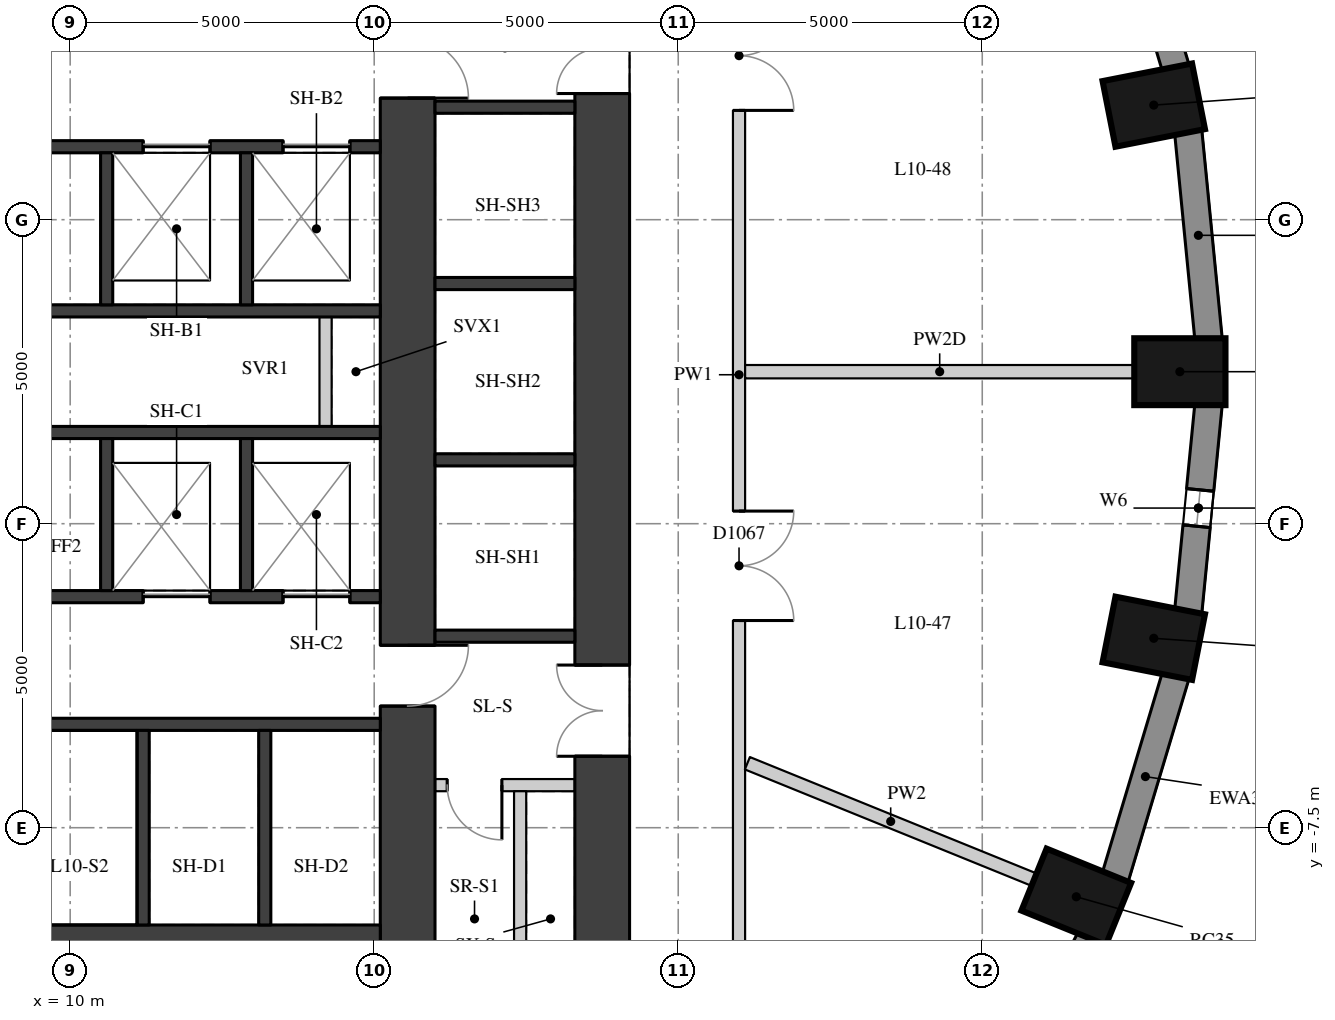
"""IFC4 building model, lengths in metres.
Left out: names, types, materials, properties, quantities, classifications, styles, units other than length and angle.
Written with IfcOpenShell. Run it as: python <this file> out.ifc"""

import sys

from ifc_helpers import new_model, si_unit, direction, frame, frame_2d, origin, origin_2d, place, context, subcontext, project, spatial, rectangle, extrude, element, fill, save


model = new_model("IFC4")
c1 = context("Model", 3, precision=1e-05, world=origin(), true_north=direction((0.0, 1.0)))
c2 = subcontext(c1, "Body", "Model", "MODEL_VIEW")
j1 = project(units=[si_unit("LENGTHUNIT", "METRE"), si_unit("PLANEANGLEUNIT", "RADIAN")], contexts=[c1])
p1 = place(None, origin())
s1 = spatial("IfcSite", under=j1, at=p1, CompositionType="ELEMENT")
p2 = place(p1, origin())
s2 = spatial("IfcBuilding", under=s1, at=p2, CompositionType="ELEMENT")
p3 = place(p2, frame((0.0, 0.0, 41.5)))
s3 = spatial("IfcBuildingStorey", under=s2, at=p3, CompositionType="ELEMENT", Elevation=41.5)
for number, where, z_axis, x_axis in (
    (1, (28.25, 0.0, 0.0), (0.0, 0.0, 1.0), (1.0, 0.0, 0.0)),
    (2, (27.821, 4.385, 0.0), (0.0, 0.0, 1.0), (0.981, 0.193, 0.0)),
    (3, (26.546, -8.636, 0.0), (0.0, 0.0, 1.0), (0.927, -0.376, 0.0)),
    (4, (27.821, -4.385, 0.0), (0.0, 0.0, 1.0), (0.981, -0.193, 0.0)),
):
    element("IfcColumn", number, at=place(p3, frame(where, z_axis=z_axis, x_axis=x_axis)), inside=s3, PredefinedType="COLUMN", context=c2, shape_type="SweptSolid", body=[
        extrude(rectangle(XDim=1.5, YDim=1.1, at=origin_2d()), origin(), (0.0, 0.0, 1.0), 3.3),
    ])
p4 = place(p3, frame((28.722, 0.53, 0.0), z_axis=(0.0, 0.0, 1.0), x_axis=(-0.097389581596, 0.995246336038, 0.0)))
e5 = element("IfcWall", 5, at=p4, inside=s3, PredefinedType="SOLIDWALL", context=c2, shape_type="SweptSolid", body=[
    extrude(rectangle(XDim=3.442, YDim=0.45, at=frame_2d((1.721, 0.0))), origin(), (0.0, 0.0, 1.0), 3.02),
])
p5 = place(p3, frame((28.182, 4.996, 0.0), z_axis=(0.0, 0.0, 1.0), x_axis=(-0.287064133733, 0.957911364963, 0.0)))
e6 = element("IfcWall", 6, at=p5, inside=s3, PredefinedType="SOLIDWALL", context=c2, shape_type="SweptSolid", body=[
    extrude(rectangle(XDim=3.473, YDim=0.45, at=frame_2d((1.737, 0.0))), origin(), (0.0, 0.0, 1.0), 3.02),
])
p6 = place(p5, frame((1.437, 0.0, 0.4)))
e7 = element("IfcOpeningElement", 7, at=p6, cuts=e6, PredefinedType="OPENING", context=c2, shape_type="SweptSolid", body=[
    extrude(rectangle(XDim=0.6, YDim=1.75, at=frame_2d((0.3, 0.875))), frame((0.0, 0.235, 0.0), z_axis=(0.0, -1.0, 0.0), x_axis=(1.0, 0.0, 0.0)), (0.0, 0.0, 1.0), 0.47),
])
p7 = place(p3, frame((25.152, -12.437, 0.0), z_axis=(0.0, 0.0, 1.0), x_axis=(0.462492775226, 0.886623050041, 0.0)))
e8 = element("IfcWall", 8, at=p7, inside=s3, PredefinedType="SOLIDWALL", context=c2, shape_type="SweptSolid", body=[
    extrude(rectangle(XDim=3.532, YDim=0.45, at=frame_2d((1.766, 0.0))), origin(), (0.0, 0.0, 1.0), 3.02),
])
p8 = place(p7, frame((1.466, 0.0, 0.4)))
e9 = element("IfcOpeningElement", 9, at=p8, cuts=e8, PredefinedType="OPENING", context=c2, shape_type="SweptSolid", body=[
    extrude(rectangle(XDim=0.6, YDim=1.75, at=frame_2d((0.3, 0.875))), frame((0.0, 0.235, 0.0), z_axis=(0.0, -1.0, 0.0), x_axis=(1.0, 0.0, 0.0)), (0.0, 0.0, 1.0), 0.47),
])
p9 = place(p3, frame((27.185, -8.323, 0.0), z_axis=(0.0, 0.0, 1.0), x_axis=(0.287064133733, 0.957911364963, 0.0)))
e10 = element("IfcWall", 10, at=p9, inside=s3, PredefinedType="SOLIDWALL", context=c2, shape_type="SweptSolid", body=[
    extrude(rectangle(XDim=3.473, YDim=0.45, at=frame_2d((1.737, 0.0))), origin(), (0.0, 0.0, 1.0), 3.02),
])
p10 = place(p3, frame((28.387, -3.956, 0.0), z_axis=(0.0, 0.0, 1.0), x_axis=(0.097389581596, 0.995246336038, 0.0)))
e11 = element("IfcWall", 11, at=p10, inside=s3, PredefinedType="SOLIDWALL", context=c2, shape_type="SweptSolid", body=[
    extrude(rectangle(XDim=3.442, YDim=0.45, at=frame_2d((1.721, 0.0))), origin(), (0.0, 0.0, 1.0), 3.02),
])
p11 = place(p10, frame((1.421, 0.0, 0.4)))
e12 = element("IfcOpeningElement", 12, at=p11, cuts=e11, PredefinedType="OPENING", context=c2, shape_type="SweptSolid", body=[
    extrude(rectangle(XDim=0.6, YDim=1.75, at=frame_2d((0.3, 0.875))), frame((0.0, 0.235, 0.0), z_axis=(0.0, -1.0, 0.0), x_axis=(1.0, 0.0, 0.0)), (0.0, 0.0, 1.0), 0.47),
])
p12 = place(p3, frame((18.75, -11.1, 0.0), z_axis=(0.0, 0.0, 1.0), x_axis=(0.0, 1.0, 0.0)))
e13 = element("IfcWall", 13, at=p12, inside=s3, PredefinedType="SHEAR", context=c2, shape_type="SweptSolid", body=[
    extrude(rectangle(XDim=22.2, YDim=0.9, at=frame_2d((11.1, 0.0))), origin(), (0.0, 0.0, 1.0), 3.02),
])
p13 = place(p12, frame((15.675, 0.0, 0.0)))
e14 = element("IfcOpeningElement", 14, at=p13, cuts=e13, PredefinedType="OPENING", context=c2, shape_type="SweptSolid", body=[
    extrude(rectangle(XDim=1.5, YDim=2.1, at=frame_2d((0.75, 1.05))), frame((0.0, 0.46, 0.0), z_axis=(0.0, -1.0, 0.0), x_axis=(1.0, 0.0, 0.0)), (0.0, 0.0, 1.0), 0.92),
])
p14 = place(p12, frame((4.775, 0.0, 0.0)))
e15 = element("IfcOpeningElement", 15, at=p14, cuts=e13, PredefinedType="OPENING", context=c2, shape_type="SweptSolid", body=[
    extrude(rectangle(XDim=1.5, YDim=2.1, at=frame_2d((0.75, 1.05))), frame((0.0, 0.46, 0.0), z_axis=(0.0, -1.0, 0.0), x_axis=(1.0, 0.0, 0.0)), (0.0, 0.0, 1.0), 0.92),
])
p15 = place(p3, frame((15.55, -11.1, 0.0), z_axis=(0.0, 0.0, 1.0), x_axis=(0.0, 1.0, 0.0)))
e16 = element("IfcWall", 16, at=p15, inside=s3, PredefinedType="SHEAR", context=c2, shape_type="SweptSolid", body=[
    extrude(rectangle(XDim=22.2, YDim=0.9, at=frame_2d((11.1, 0.0))), origin(), (0.0, 0.0, 1.0), 3.02),
])
p16 = place(p15, frame((15.6, 0.0, 0.0)))
e17 = element("IfcOpeningElement", 17, at=p16, cuts=e16, PredefinedType="OPENING", context=c2, shape_type="SweptSolid", body=[
    extrude(rectangle(XDim=1.0, YDim=2.1, at=frame_2d((0.5, 1.05))), frame((0.0, 0.46, 0.0), z_axis=(0.0, -1.0, 0.0), x_axis=(1.0, 0.0, 0.0)), (0.0, 0.0, 1.0), 0.92),
])
p17 = place(p15, frame((5.6, 0.0, 0.0)))
e18 = element("IfcOpeningElement", 18, at=p17, cuts=e16, PredefinedType="OPENING", context=c2, shape_type="SweptSolid", body=[
    extrude(rectangle(XDim=1.0, YDim=2.1, at=frame_2d((0.5, 1.05))), frame((0.0, 0.46, 0.0), z_axis=(0.0, -1.0, 0.0), x_axis=(1.0, 0.0, 0.0)), (0.0, 0.0, 1.0), 0.92),
])
p18 = place(p3, frame((4.9, -9.55, 0.0), z_axis=(0.0, 0.0, 1.0), x_axis=(1.0, 0.0, 0.0)))
e19 = element("IfcWall", 19, at=p18, inside=s3, PredefinedType="SHEAR", context=c2, shape_type="SweptSolid", body=[
    extrude(rectangle(XDim=10.2, YDim=0.9, at=frame_2d((5.1, 0.0))), origin(), (0.0, 0.0, 1.0), 3.02),
])
p19 = place(p3, frame((4.9, 3.7, 0.0), z_axis=(0.0, 0.0, 1.0), x_axis=(1.0, 0.0, 0.0)))
e20 = element("IfcWall", 20, at=p19, inside=s3, PredefinedType="SHEAR", context=c2, shape_type="SweptSolid", body=[
    extrude(rectangle(XDim=10.2, YDim=0.2, at=frame_2d((5.1, 0.0))), origin(), (0.0, 0.0, 1.0), 3.02),
])
p20 = place(p19, frame((6.3, 0.0, 0.0)))
e21 = element("IfcOpeningElement", 21, at=p20, cuts=e20, PredefinedType="OPENING", context=c2, shape_type="SweptSolid", body=[
    extrude(rectangle(XDim=1.1, YDim=2.1, at=frame_2d((0.55, 1.05))), frame((0.0, 0.11, 0.0), z_axis=(0.0, -1.0, 0.0), x_axis=(1.0, 0.0, 0.0)), (0.0, 0.0, 1.0), 0.22),
])
p21 = place(p19, frame((8.6, 0.0, 0.0)))
e22 = element("IfcOpeningElement", 22, at=p21, cuts=e20, PredefinedType="OPENING", context=c2, shape_type="SweptSolid", body=[
    extrude(rectangle(XDim=1.1, YDim=2.1, at=frame_2d((0.55, 1.05))), frame((0.0, 0.11, 0.0), z_axis=(0.0, -1.0, 0.0), x_axis=(1.0, 0.0, 0.0)), (0.0, 0.0, 1.0), 0.22),
])
for number, where, z_axis, x_axis in (
    (23, (4.9, 1.0, 0.0), (0.0, 0.0, 1.0), (1.0, 0.0, 0.0)),
    (24, (4.9, -1.0, 0.0), (0.0, 0.0, 1.0), (1.0, 0.0, 0.0)),
):
    element("IfcWall", number, at=place(p3, frame(where, z_axis=z_axis, x_axis=x_axis)), inside=s3, PredefinedType="SHEAR", context=c2, shape_type="SweptSolid", body=[
        extrude(rectangle(XDim=10.2, YDim=0.2, at=frame_2d((5.1, 0.0))), origin(), (0.0, 0.0, 1.0), 3.02),
    ])
p22 = place(p3, frame((4.9, -3.7, 0.0), z_axis=(0.0, 0.0, 1.0), x_axis=(1.0, 0.0, 0.0)))
e25 = element("IfcWall", 25, at=p22, inside=s3, PredefinedType="SHEAR", context=c2, shape_type="SweptSolid", body=[
    extrude(rectangle(XDim=10.2, YDim=0.2, at=frame_2d((5.1, 0.0))), origin(), (0.0, 0.0, 1.0), 3.02),
])
p23 = place(p22, frame((6.3, 0.0, 0.0)))
e26 = element("IfcOpeningElement", 26, at=p23, cuts=e25, PredefinedType="OPENING", context=c2, shape_type="SweptSolid", body=[
    extrude(rectangle(XDim=1.1, YDim=2.1, at=frame_2d((0.55, 1.05))), frame((0.0, 0.11, 0.0), z_axis=(0.0, -1.0, 0.0), x_axis=(1.0, 0.0, 0.0)), (0.0, 0.0, 1.0), 0.22),
])
p24 = place(p22, frame((8.6, 0.0, 0.0)))
e27 = element("IfcOpeningElement", 27, at=p24, cuts=e25, PredefinedType="OPENING", context=c2, shape_type="SweptSolid", body=[
    extrude(rectangle(XDim=1.1, YDim=2.1, at=frame_2d((0.55, 1.05))), frame((0.0, 0.11, 0.0), z_axis=(0.0, -1.0, 0.0), x_axis=(1.0, 0.0, 0.0)), (0.0, 0.0, 1.0), 0.22),
])
p25 = place(p3, frame((4.9, -5.8, 0.0), z_axis=(0.0, 0.0, 1.0), x_axis=(1.0, 0.0, 0.0)))
e28 = element("IfcWall", 28, at=p25, inside=s3, PredefinedType="SHEAR", context=c2, shape_type="SweptSolid", body=[
    extrude(rectangle(XDim=10.2, YDim=0.2, at=frame_2d((5.1, 0.0))), origin(), (0.0, 0.0, 1.0), 3.02),
])
for number, where, z_axis, x_axis in (
    (29, (11.2, -9.1, 0.0), (0.0, 0.0, 1.0), (0.0, 1.0, 0.0)),
    (30, (13.2, -9.1, 0.0), (0.0, 0.0, 1.0), (0.0, 1.0, 0.0)),
):
    element("IfcWall", number, at=place(p3, frame(where, z_axis=z_axis, x_axis=x_axis)), inside=s3, PredefinedType="SHEAR", context=c2, shape_type="SweptSolid", body=[
        extrude(rectangle(XDim=3.2, YDim=0.2, at=frame_2d((1.6, 0.0))), origin(), (0.0, 0.0, 1.0), 3.02),
    ])
for number, where, z_axis, x_axis in (
    (31, (10.6, 1.1, 0.0), (0.0, 0.0, 1.0), (0.0, 1.0, 0.0)),
    (32, (10.6, -3.6, 0.0), (0.0, 0.0, 1.0), (0.0, 1.0, 0.0)),
    (33, (12.9, 1.1, 0.0), (0.0, 0.0, 1.0), (0.0, 1.0, 0.0)),
    (34, (12.9, -3.6, 0.0), (0.0, 0.0, 1.0), (0.0, 1.0, 0.0)),
):
    element("IfcWall", number, at=place(p3, frame(where, z_axis=z_axis, x_axis=x_axis)), inside=s3, PredefinedType="SHEAR", context=c2, shape_type="SweptSolid", body=[
        extrude(rectangle(XDim=2.5, YDim=0.2, at=frame_2d((1.25, 0.0))), origin(), (0.0, 0.0, 1.0), 3.02),
    ])
p26 = place(p3, frame((14.2, -0.9, 0.0), z_axis=(0.0, 0.0, 1.0), x_axis=(0.0, 1.0, 0.0)))
e35 = element("IfcWall", 35, at=p26, inside=s3, PredefinedType="PARTITIONING", context=c2, shape_type="SweptSolid", body=[
    extrude(rectangle(XDim=1.8, YDim=0.2, at=frame_2d((0.9, 0.0))), origin(), (0.0, 0.0, 1.0), 3.02),
])
for number, where, z_axis, x_axis in (
    (36, (16.0, -4.35, 0.0), (0.0, 0.0, 1.0), (1.0, 0.0, 0.0)),
    (37, (16.0, -1.45, 0.0), (0.0, 0.0, 1.0), (1.0, 0.0, 0.0)),
    (38, (16.0, 1.45, 0.0), (0.0, 0.0, 1.0), (1.0, 0.0, 0.0)),
    (39, (16.0, 4.35, 0.0), (0.0, 0.0, 1.0), (1.0, 0.0, 0.0)),
):
    element("IfcWall", number, at=place(p3, frame(where, z_axis=z_axis, x_axis=x_axis)), inside=s3, PredefinedType="SHEAR", context=c2, shape_type="SweptSolid", body=[
        extrude(rectangle(XDim=2.3, YDim=0.2, at=frame_2d((1.15, 0.0))), origin(), (0.0, 0.0, 1.0), 3.02),
    ])
p27 = place(p3, frame((16.0, -6.8, 0.0), z_axis=(0.0, 0.0, 1.0), x_axis=(1.0, 0.0, 0.0)))
e40 = element("IfcWall", 40, at=p27, inside=s3, PredefinedType="PARTITIONING", context=c2, shape_type="SweptSolid", body=[
    extrude(rectangle(XDim=2.3, YDim=0.2, at=frame_2d((1.15, 0.0))), origin(), (0.0, 0.0, 1.0), 3.02),
])
p28 = place(p27, frame((0.2, 0.0, 0.0)))
e41 = element("IfcOpeningElement", 41, at=p28, cuts=e40, PredefinedType="OPENING", context=c2, shape_type="SweptSolid", body=[
    extrude(rectangle(XDim=0.9, YDim=2.1, at=frame_2d((0.45, 1.05))), frame((0.0, 0.11, 0.0), z_axis=(0.0, -1.0, 0.0), x_axis=(1.0, 0.0, 0.0)), (0.0, 0.0, 1.0), 0.22),
])
p29 = place(p3, frame((17.4, -11.1, 0.0), z_axis=(0.0, 0.0, 1.0), x_axis=(0.0, 1.0, 0.0)))
e42 = element("IfcWall", 42, at=p29, inside=s3, PredefinedType="PARTITIONING", context=c2, shape_type="SweptSolid", body=[
    extrude(rectangle(XDim=4.2, YDim=0.2, at=frame_2d((2.1, 0.0))), origin(), (0.0, 0.0, 1.0), 3.02),
])
p30 = place(p3, frame((21.0, 13.7, 0.0), z_axis=(0.0, 0.0, 1.0), x_axis=(0.0, -1.0, 0.0)))
e43 = element("IfcWall", 43, at=p30, inside=s3, PredefinedType="PARTITIONING", context=c2, shape_type="SweptSolid", body=[
    extrude(rectangle(XDim=27.5, YDim=0.2, at=frame_2d((13.75, 0.0))), origin(), (0.0, 0.0, 1.0), 3.02),
])
p31 = place(p30, frame((15.992, 0.0, 0.0)))
e44 = element("IfcOpeningElement", 44, at=p31, cuts=e43, PredefinedType="OPENING", context=c2, shape_type="SweptSolid", body=[
    extrude(rectangle(XDim=1.8, YDim=2.1, at=frame_2d((0.9, 1.05))), frame((0.0, 0.11, 0.0), z_axis=(0.0, -1.0, 0.0), x_axis=(1.0, 0.0, 0.0)), (0.0, 0.0, 1.0), 0.22),
])
p32 = place(p30, frame((7.602, 0.0, 0.0)))
e45 = element("IfcOpeningElement", 45, at=p32, cuts=e43, PredefinedType="OPENING", context=c2, shape_type="SweptSolid", body=[
    extrude(rectangle(XDim=1.8, YDim=2.1, at=frame_2d((0.9, 1.05))), frame((0.0, 0.11, 0.0), z_axis=(0.0, -1.0, 0.0), x_axis=(1.0, 0.0, 0.0)), (0.0, 0.0, 1.0), 0.22),
])
p33 = place(p3, frame((27.5, 0.0, 0.0), z_axis=(0.0, 0.0, 1.0), x_axis=(-1.0, 0.0, 0.0)))
e46 = element("IfcWall", 46, at=p33, inside=s3, PredefinedType="PARTITIONING", context=c2, shape_type="SweptSolid", body=[
    extrude(rectangle(XDim=6.4, YDim=0.22, at=frame_2d((3.2, 0.0))), origin(), (0.0, 0.0, 1.0), 2.47),
])
p34 = place(p3, frame((25.851, -8.354, 0.0), z_axis=(0.0, 0.0, 1.0), x_axis=(-0.926538195631, 0.376200707118, 0.0)))
e47 = element("IfcWall", 47, at=p34, inside=s3, PredefinedType="PARTITIONING", context=c2, shape_type="SweptSolid", body=[
    extrude(rectangle(XDim=5.088, YDim=0.22, at=frame_2d((2.544, 0.0))), origin(), (0.0, 0.0, 1.0), 3.02),
])
p35 = place(p11, origin())
e48 = element("IfcWindow", 48, at=p35, inside=s3, PartitioningType="SINGLE_PANEL", PredefinedType="WINDOW", context=c2, shape_type="SweptSolid", body=[
    extrude(rectangle(XDim=0.6, YDim=1.75, at=frame_2d((0.3, 0.875))), frame((0.0, 0.035, 0.0), z_axis=(0.0, -1.0, 0.0), x_axis=(1.0, 0.0, 0.0)), (0.0, 0.0, 1.0), 0.06),
])
fill(e12, e48)
p36 = place(p13, origin())
e49 = element("IfcDoor", 49, at=p36, inside=s3, OperationType="DOUBLE_DOOR_SINGLE_SWING", PredefinedType="DOOR", context=c2, shape_type="SweptSolid", body=[
    extrude(rectangle(XDim=1.5, YDim=2.1, at=frame_2d((0.75, 1.05))), frame((0.0, 0.025, 0.0), z_axis=(0.0, -1.0, 0.0), x_axis=(1.0, 0.0, 0.0)), (0.0, 0.0, 1.0), 0.05),
])
fill(e14, e49)
p37 = place(p14, origin())
e50 = element("IfcDoor", 50, at=p37, inside=s3, OperationType="DOUBLE_DOOR_SINGLE_SWING", PredefinedType="DOOR", context=c2, shape_type="SweptSolid", body=[
    extrude(rectangle(XDim=1.5, YDim=2.1, at=frame_2d((0.75, 1.05))), frame((0.0, 0.025, 0.0), z_axis=(0.0, -1.0, 0.0), x_axis=(1.0, 0.0, 0.0)), (0.0, 0.0, 1.0), 0.05),
])
fill(e15, e50)
p38 = place(p20, origin())
e51 = element("IfcDoor", 51, at=p38, inside=s3, OperationType="DOUBLE_DOOR_SLIDING", PredefinedType="DOOR", context=c2, shape_type="SweptSolid", body=[
    extrude(rectangle(XDim=1.1, YDim=2.1, at=frame_2d((0.55, 1.05))), frame((0.0, 0.025, 0.0), z_axis=(0.0, -1.0, 0.0), x_axis=(1.0, 0.0, 0.0)), (0.0, 0.0, 1.0), 0.05),
])
fill(e21, e51)
p39 = place(p21, origin())
e52 = element("IfcDoor", 52, at=p39, inside=s3, OperationType="DOUBLE_DOOR_SLIDING", PredefinedType="DOOR", context=c2, shape_type="SweptSolid", body=[
    extrude(rectangle(XDim=1.1, YDim=2.1, at=frame_2d((0.55, 1.05))), frame((0.0, 0.025, 0.0), z_axis=(0.0, -1.0, 0.0), x_axis=(1.0, 0.0, 0.0)), (0.0, 0.0, 1.0), 0.05),
])
fill(e22, e52)
p40 = place(p23, origin())
e53 = element("IfcDoor", 53, at=p40, inside=s3, OperationType="DOUBLE_DOOR_SLIDING", PredefinedType="DOOR", context=c2, shape_type="SweptSolid", body=[
    extrude(rectangle(XDim=1.1, YDim=2.1, at=frame_2d((0.55, 1.05))), frame((0.0, 0.025, 0.0), z_axis=(0.0, -1.0, 0.0), x_axis=(1.0, 0.0, 0.0)), (0.0, 0.0, 1.0), 0.05),
])
fill(e26, e53)
p41 = place(p24, origin())
e54 = element("IfcDoor", 54, at=p41, inside=s3, OperationType="DOUBLE_DOOR_SLIDING", PredefinedType="DOOR", context=c2, shape_type="SweptSolid", body=[
    extrude(rectangle(XDim=1.1, YDim=2.1, at=frame_2d((0.55, 1.05))), frame((0.0, 0.025, 0.0), z_axis=(0.0, -1.0, 0.0), x_axis=(1.0, 0.0, 0.0)), (0.0, 0.0, 1.0), 0.05),
])
fill(e27, e54)
p42 = place(p16, origin())
e55 = element("IfcDoor", 55, at=p42, inside=s3, OperationType="SINGLE_SWING_RIGHT", PredefinedType="DOOR", context=c2, shape_type="SweptSolid", body=[
    extrude(rectangle(XDim=1.0, YDim=2.1, at=frame_2d((0.5, 1.05))), frame((0.0, 0.025, 0.0), z_axis=(0.0, -1.0, 0.0), x_axis=(1.0, 0.0, 0.0)), (0.0, 0.0, 1.0), 0.05),
])
fill(e17, e55)
p43 = place(p17, origin())
e56 = element("IfcDoor", 56, at=p43, inside=s3, OperationType="SINGLE_SWING_LEFT", PredefinedType="DOOR", context=c2, shape_type="SweptSolid", body=[
    extrude(rectangle(XDim=1.0, YDim=2.1, at=frame_2d((0.5, 1.05))), frame((0.0, 0.025, 0.0), z_axis=(0.0, -1.0, 0.0), x_axis=(1.0, 0.0, 0.0)), (0.0, 0.0, 1.0), 0.05),
])
fill(e18, e56)
p44 = place(p28, origin())
e57 = element("IfcDoor", 57, at=p44, inside=s3, OperationType="SINGLE_SWING_LEFT", PredefinedType="DOOR", context=c2, shape_type="SweptSolid", body=[
    extrude(rectangle(XDim=0.9, YDim=2.1, at=frame_2d((0.45, 1.05))), frame((0.0, 0.025, 0.0), z_axis=(0.0, -1.0, 0.0), x_axis=(1.0, 0.0, 0.0)), (0.0, 0.0, 1.0), 0.05),
])
fill(e41, e57)
p45 = place(p31, origin())
e58 = element("IfcDoor", 58, at=p45, inside=s3, OperationType="DOUBLE_DOOR_SINGLE_SWING", PredefinedType="DOOR", context=c2, shape_type="SweptSolid", body=[
    extrude(rectangle(XDim=1.8, YDim=2.1, at=frame_2d((0.9, 1.05))), frame((0.0, 0.025, 0.0), z_axis=(0.0, -1.0, 0.0), x_axis=(1.0, 0.0, 0.0)), (0.0, 0.0, 1.0), 0.05),
])
fill(e44, e58)
p46 = place(p32, origin())
e59 = element("IfcDoor", 59, at=p46, inside=s3, OperationType="DOUBLE_DOOR_SINGLE_SWING", PredefinedType="DOOR", context=c2, shape_type="SweptSolid", body=[
    extrude(rectangle(XDim=1.8, YDim=2.1, at=frame_2d((0.9, 1.05))), frame((0.0, 0.025, 0.0), z_axis=(0.0, -1.0, 0.0), x_axis=(1.0, 0.0, 0.0)), (0.0, 0.0, 1.0), 0.05),
])
fill(e45, e59)
save(model, sys.argv[1])
